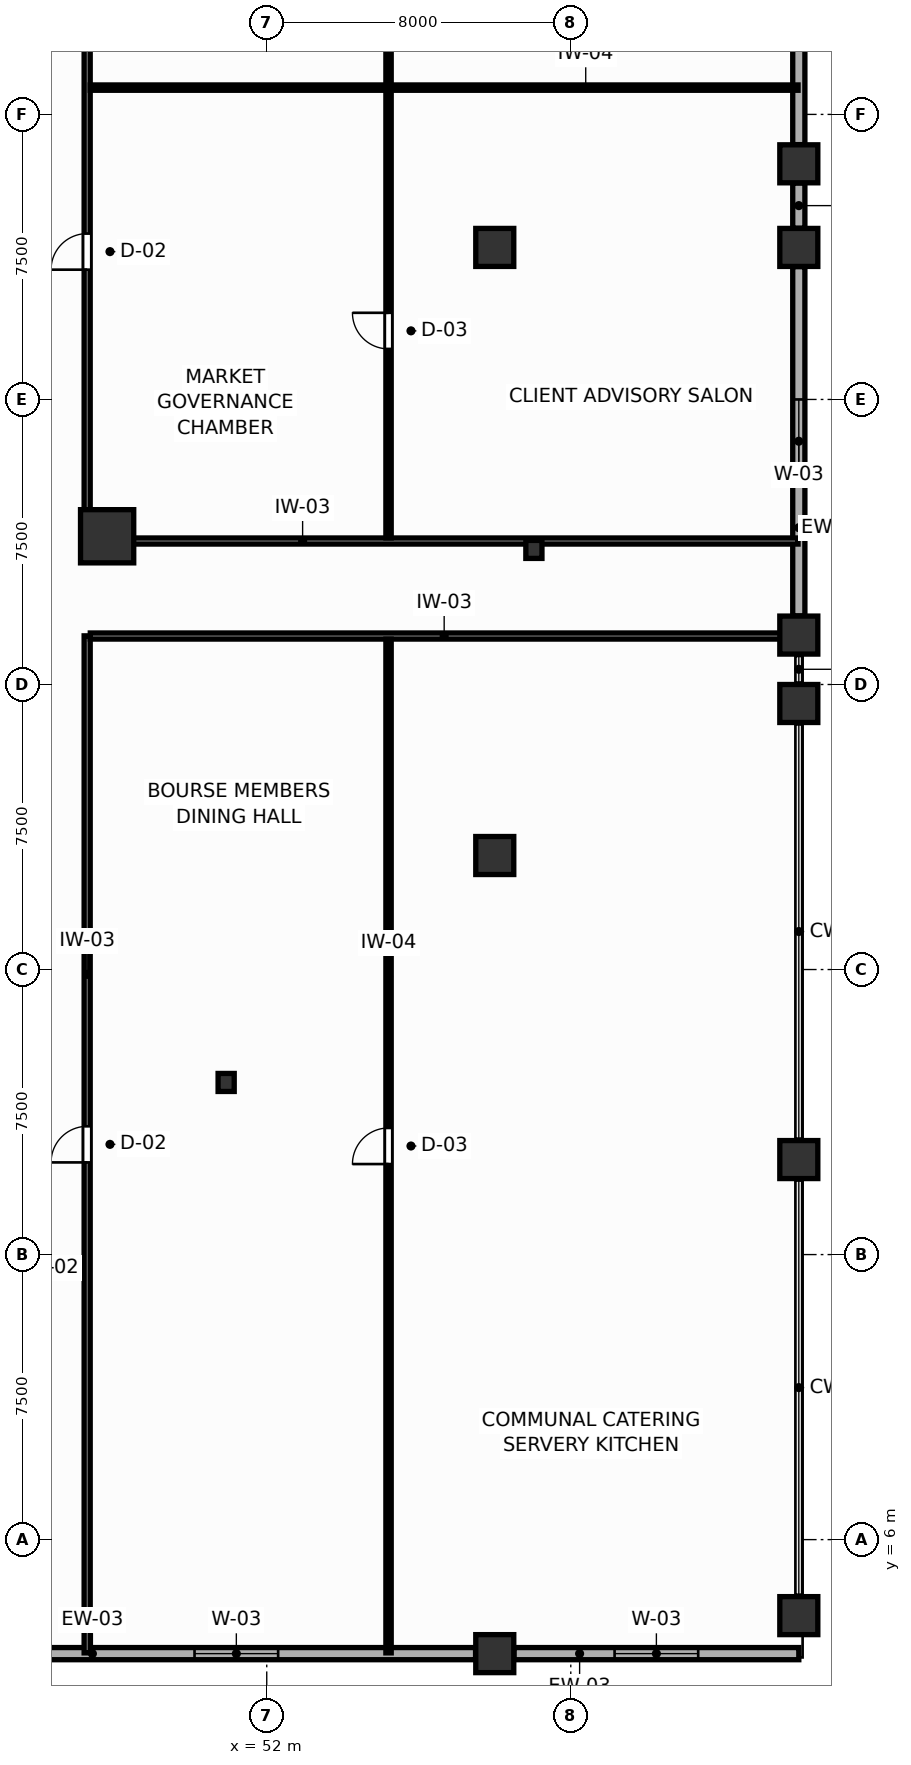
"""IFC4 building model, lengths in metres.
Left out: names, types, materials, properties, quantities, classifications, styles, units other than length and angle.
Written with IfcOpenShell. Run it as: python <this file> out.ifc"""

import sys

from ifc_helpers import new_model, si_unit, direction, frame, frame_2d, origin, origin_2d, place, context, subcontext, project, spatial, rectangle, i_section, extrude, source, transform, mapped, element, fill, save


model = new_model("IFC4")
c1 = context("Model", 3, precision=1e-05, world=origin(), true_north=direction((0.0, 1.0)))
c2 = subcontext(c1, "Body", "Model", "MODEL_VIEW")
j1 = project(units=[si_unit("LENGTHUNIT", "METRE"), si_unit("PLANEANGLEUNIT", "RADIAN")], contexts=[c1])
p1 = place(None, origin())
s1 = spatial("IfcSite", under=j1, at=p1, CompositionType="ELEMENT")
p2 = place(p1, origin())
s2 = spatial("IfcBuilding", under=s1, at=p2, CompositionType="ELEMENT")
p3 = place(p2, frame((0.0, 0.0, 14.4)))
s3 = spatial("IfcBuildingStorey", under=s2, at=p3, CompositionType="ELEMENT", Elevation=14.4)
m1 = source(origin(), c2, "Body", "SweptSolid", [
    extrude(rectangle(XDim=1.4, YDim=1.4, at=origin_2d()), origin(), (0.0, 0.0, 1.0), 4.8),
])
p4 = place(p3, frame((47.8, 32.4, 0.0), z_axis=(0.0, 0.0, 1.0), x_axis=(1.0, 0.0, 0.0)))
e1 = element("IfcColumn", 1, at=p4, inside=s3, PredefinedType="COLUMN", context=c2, shape_type="MappedRepresentation", body=[
    mapped(m1, transform((0.0, 0.0, 0.0), scale=1.0)),
])
m2 = source(origin(), c2, "Body", "SweptSolid", [
    extrude(rectangle(XDim=1.0, YDim=1.0, at=origin_2d()), origin(), (0.0, 0.0, 1.0), 4.8),
])
for number, where, z_axis, x_axis in (
    (2, (66.0, 4.0, 0.0), (0.0, 0.0, 1.0), (1.0, 0.0, 0.0)),
    (3, (66.0, 16.0, 0.0), (0.0, 0.0, 1.0), (1.0, 0.0, 0.0)),
    (4, (66.0, 28.0, 0.0), (0.0, 0.0, 1.0), (1.0, 0.0, 0.0)),
    (5, (66.0, 40.0, 0.0), (0.0, 0.0, 1.0), (1.0, 0.0, 0.0)),
    (6, (58.0, 3.0, 0.0), (0.0, 0.0, 1.0), (1.0, 0.0, 0.0)),
    (7, (58.0, 24.0, 0.0), (0.0, 0.0, 1.0), (1.0, 0.0, 0.0)),
    (8, (58.0, 40.0, 0.0), (0.0, 0.0, 1.0), (1.0, 0.0, 0.0)),
    (9, (66.0, 29.8, 0.0), (0.0, 0.0, 1.0), (1.0, 0.0, 0.0)),
    (10, (66.0, 42.2, 0.0), (0.0, 0.0, 1.0), (1.0, 0.0, 0.0)),
):
    element("IfcColumn", number, at=place(p3, frame(where, z_axis=z_axis, x_axis=x_axis)), inside=s3, PredefinedType="COLUMN", context=c2, shape_type="MappedRepresentation", body=[
        mapped(m2, transform((0.0, 0.0, 0.0), scale=1.0)),
    ])
m3 = source(origin(), c2, "Body", "SweptSolid", [
    extrude(i_section(OverallWidth=0.424, OverallDepth=0.474, WebThickness=0.045, FlangeThickness=0.072, FilletRadius=0.015, at=origin_2d()), origin(), (0.0, 0.0, 1.0), 4.8),
])
for number, where, z_axis, x_axis in (
    (11, (50.932, 18.029, 0.0), (0.0, 0.0, 1.0), (1.0, 0.0, 0.0)),
    (12, (59.03, 32.054, 0.0), (0.0, 0.0, 1.0), (1.0, 0.0, 0.0)),
):
    element("IfcColumn", number, at=place(p3, frame(where, z_axis=z_axis, x_axis=x_axis)), inside=s3, PredefinedType="COLUMN", context=c2, shape_type="MappedRepresentation", body=[
        mapped(m3, transform((0.0, 0.0, 0.0), scale=1.0)),
    ])
p5 = place(p3, frame((44.905, 3.0, 0.0), z_axis=(0.0, 0.0, 1.0), x_axis=(1.0, 0.0, 0.0)))
e13 = element("IfcWall", 13, at=p5, inside=s3, PredefinedType="SOLIDWALL", context=c2, shape_type="SweptSolid", body=[
    extrude(rectangle(XDim=12.59, YDim=0.32, at=frame_2d((6.295, 0.0))), origin(), (0.0, 0.0, 1.0), 3.82),
])
p6 = place(p5, frame((5.195, 0.0, 0.75)))
e14 = element("IfcOpeningElement", 14, at=p6, cuts=e13, PredefinedType="OPENING", context=c2, shape_type="SweptSolid", body=[
    extrude(rectangle(XDim=2.2, YDim=2.0, at=frame_2d((1.1, 1.0))), frame((0.0, 0.17, 0.0), z_axis=(0.0, -1.0, 0.0), x_axis=(1.0, 0.0, 0.0)), (0.0, 0.0, 1.0), 0.34),
])
p7 = place(p3, frame((58.505, 3.0, 0.0), z_axis=(0.0, 0.0, 1.0), x_axis=(1.0, 0.0, 0.0)))
e15 = element("IfcWall", 15, at=p7, inside=s3, PredefinedType="SOLIDWALL", context=c2, shape_type="SweptSolid", body=[
    extrude(rectangle(XDim=7.495, YDim=0.32, at=frame_2d((3.748, 0.0))), origin(), (0.0, 0.0, 1.0), 3.82),
])
p8 = place(p7, frame((2.647, 0.0, 0.75)))
e16 = element("IfcOpeningElement", 16, at=p8, cuts=e15, PredefinedType="OPENING", context=c2, shape_type="SweptSolid", body=[
    extrude(rectangle(XDim=2.2, YDim=2.0, at=frame_2d((1.1, 1.0))), frame((0.0, 0.17, 0.0), z_axis=(0.0, -1.0, 0.0), x_axis=(1.0, 0.0, 0.0)), (0.0, 0.0, 1.0), 0.34),
])
p9 = place(p3, frame((66.0, 30.305, 0.0), z_axis=(0.0, 0.0, 1.0), x_axis=(0.0, 1.0, 0.0)))
e17 = element("IfcWall", 17, at=p9, inside=s3, PredefinedType="SOLIDWALL", context=c2, shape_type="SweptSolid", body=[
    extrude(rectangle(XDim=9.19, YDim=0.32, at=frame_2d((4.595, 0.0))), origin(), (0.0, 0.0, 1.0), 3.82),
])
p10 = place(p9, frame((3.495, 0.0, 0.75)))
e18 = element("IfcOpeningElement", 18, at=p10, cuts=e17, PredefinedType="OPENING", context=c2, shape_type="SweptSolid", body=[
    extrude(rectangle(XDim=2.2, YDim=2.0, at=frame_2d((1.1, 1.0))), frame((0.0, 0.17, 0.0), z_axis=(0.0, -1.0, 0.0), x_axis=(1.0, 0.0, 0.0)), (0.0, 0.0, 1.0), 0.34),
])
p11 = place(p3, frame((66.0, 40.505, 0.0), z_axis=(0.0, 0.0, 1.0), x_axis=(0.0, 1.0, 0.0)))
e19 = element("IfcWall", 19, at=p11, inside=s3, PredefinedType="SOLIDWALL", context=c2, shape_type="SweptSolid", body=[
    extrude(rectangle(XDim=1.19, YDim=0.32, at=frame_2d((0.595, 0.0))), origin(), (0.0, 0.0, 1.0), 3.82),
])
p12 = place(p3, frame((66.0, 42.705, 0.0), z_axis=(0.0, 0.0, 1.0), x_axis=(0.0, 1.0, 0.0)))
e20 = element("IfcWall", 20, at=p12, inside=s3, PredefinedType="SOLIDWALL", context=c2, shape_type="SweptSolid", body=[
    extrude(rectangle(XDim=7.27, YDim=0.32, at=frame_2d((3.635, 0.0))), origin(), (0.0, 0.0, 1.0), 3.82),
])
p13 = place(p12, frame((2.535, 0.0, 0.75)))
e21 = element("IfcOpeningElement", 21, at=p13, cuts=e20, PredefinedType="OPENING", context=c2, shape_type="SweptSolid", body=[
    extrude(rectangle(XDim=2.2, YDim=2.0, at=frame_2d((1.1, 1.0))), frame((0.0, 0.17, 0.0), z_axis=(0.0, -1.0, 0.0), x_axis=(1.0, 0.0, 0.0)), (0.0, 0.0, 1.0), 0.34),
])
p14 = place(p3, frame((47.275, 3.02, 0.0), z_axis=(0.0, 0.0, 1.0), x_axis=(0.0, 1.0, 0.0)))
e22 = element("IfcWall", 22, at=p14, inside=s3, PredefinedType="PARTITIONING", context=c2, shape_type="SweptSolid", body=[
    extrude(rectangle(XDim=26.76, YDim=0.16, at=frame_2d((13.38, 0.0))), origin(), (0.0, 0.0, 1.0), 4.52),
])
p15 = place(p14, frame((12.905, 0.0, 0.0)))
e23 = element("IfcOpeningElement", 23, at=p15, cuts=e22, PredefinedType="OPENING", context=c2, shape_type="SweptSolid", body=[
    extrude(rectangle(XDim=0.95, YDim=2.05, at=frame_2d((0.475, 1.025))), frame((0.0, 0.09, 0.0), z_axis=(0.0, -1.0, 0.0), x_axis=(1.0, 0.0, 0.0)), (0.0, 0.0, 1.0), 0.18),
])
p16 = place(p3, frame((47.275, 32.27, 0.0), z_axis=(0.0, 0.0, 1.0), x_axis=(0.0, 1.0, 0.0)))
e24 = element("IfcWall", 24, at=p16, inside=s3, PredefinedType="PARTITIONING", context=c2, shape_type="SweptSolid", body=[
    extrude(rectangle(XDim=26.71, YDim=0.16, at=frame_2d((13.355, 0.0))), origin(), (0.0, 0.0, 1.0), 4.52),
])
p17 = place(p16, frame((7.145, 0.0, 0.0)))
e25 = element("IfcOpeningElement", 25, at=p17, cuts=e24, PredefinedType="OPENING", context=c2, shape_type="SweptSolid", body=[
    extrude(rectangle(XDim=0.95, YDim=2.05, at=frame_2d((0.475, 1.025))), frame((0.0, 0.09, 0.0), z_axis=(0.0, -1.0, 0.0), x_axis=(1.0, 0.0, 0.0)), (0.0, 0.0, 1.0), 0.18),
])
p18 = place(p16, frame((18.79, 0.0, 0.0)))
e26 = element("IfcOpeningElement", 26, at=p18, cuts=e24, PredefinedType="OPENING", context=c2, shape_type="SweptSolid", body=[
    extrude(rectangle(XDim=0.95, YDim=2.05, at=frame_2d((0.475, 1.025))), frame((0.0, 0.09, 0.0), z_axis=(0.0, -1.0, 0.0), x_axis=(1.0, 0.0, 0.0)), (0.0, 0.0, 1.0), 0.18),
])
p19 = place(p3, frame((47.357, 29.775, 0.0), z_axis=(0.0, 0.0, 1.0), x_axis=(1.0, 0.0, 0.0)))
e27 = element("IfcWall", 27, at=p19, inside=s3, PredefinedType="PARTITIONING", context=c2, shape_type="SweptSolid", body=[
    extrude(rectangle(XDim=18.623, YDim=0.16, at=frame_2d((9.312, 0.0))), origin(), (0.0, 0.0, 1.0), 4.52),
])
p20 = place(p3, frame((47.357, 32.275, 0.0), z_axis=(0.0, 0.0, 1.0), x_axis=(1.0, 0.0, 0.0)))
e28 = element("IfcWall", 28, at=p20, inside=s3, PredefinedType="PARTITIONING", context=c2, shape_type="SweptSolid", body=[
    extrude(rectangle(XDim=18.623, YDim=0.16, at=frame_2d((9.312, 0.0))), origin(), (0.0, 0.0, 1.0), 3.82),
])
p21 = place(p3, frame((55.205, 3.02, 0.0), z_axis=(0.0, 0.0, 1.0), x_axis=(0.0, 1.0, 0.0)))
e29 = element("IfcWall", 29, at=p21, inside=s3, PredefinedType="PARTITIONING", context=c2, shape_type="SweptSolid", body=[
    extrude(rectangle(XDim=26.673, YDim=0.14, at=frame_2d((13.336, 0.0))), origin(), (0.0, 0.0, 1.0), 4.52),
])
p22 = place(p21, frame((12.862, 0.0, 0.0)))
e30 = element("IfcOpeningElement", 30, at=p22, cuts=e29, PredefinedType="OPENING", context=c2, shape_type="SweptSolid", body=[
    extrude(rectangle(XDim=0.95, YDim=2.05, at=frame_2d((0.475, 1.025))), frame((0.0, 0.08, 0.0), z_axis=(0.0, -1.0, 0.0), x_axis=(1.0, 0.0, 0.0)), (0.0, 0.0, 1.0), 0.16),
])
p23 = place(p3, frame((55.205, 32.357, 0.0), z_axis=(0.0, 0.0, 1.0), x_axis=(0.0, 1.0, 0.0)))
e31 = element("IfcWall", 31, at=p23, inside=s3, PredefinedType="PARTITIONING", context=c2, shape_type="SweptSolid", body=[
    extrude(rectangle(XDim=26.623, YDim=0.14, at=frame_2d((13.312, 0.0))), origin(), (0.0, 0.0, 1.0), 4.52),
])
p24 = place(p23, frame((4.973, 0.0, 0.0)))
e32 = element("IfcOpeningElement", 32, at=p24, cuts=e31, PredefinedType="OPENING", context=c2, shape_type="SweptSolid", body=[
    extrude(rectangle(XDim=0.95, YDim=2.05, at=frame_2d((0.475, 1.025))), frame((0.0, 0.08, 0.0), z_axis=(0.0, -1.0, 0.0), x_axis=(1.0, 0.0, 0.0)), (0.0, 0.0, 1.0), 0.16),
])
p25 = place(p23, frame((20.419, 0.0, 0.0)))
e33 = element("IfcOpeningElement", 33, at=p25, cuts=e31, PredefinedType="OPENING", context=c2, shape_type="SweptSolid", body=[
    extrude(rectangle(XDim=0.95, YDim=2.05, at=frame_2d((0.475, 1.025))), frame((0.0, 0.08, 0.0), z_axis=(0.0, -1.0, 0.0), x_axis=(1.0, 0.0, 0.0)), (0.0, 0.0, 1.0), 0.16),
])
p26 = place(p3, frame((47.357, 44.205, 0.0), z_axis=(0.0, 0.0, 1.0), x_axis=(1.0, 0.0, 0.0)))
e34 = element("IfcWall", 34, at=p26, inside=s3, PredefinedType="PARTITIONING", context=c2, shape_type="SweptSolid", body=[
    extrude(rectangle(XDim=18.623, YDim=0.14, at=frame_2d((9.312, 0.0))), origin(), (0.0, 0.0, 1.0), 4.52),
])
p27 = place(p6, origin())
e35 = element("IfcWindow", 35, at=p27, inside=s3, PartitioningType="SINGLE_PANEL", PredefinedType="WINDOW", context=c2, shape_type="SweptSolid", body=[
    extrude(rectangle(XDim=2.2, YDim=2.0, at=frame_2d((1.1, 1.0))), frame((0.0, 0.03, 0.0), z_axis=(0.0, -1.0, 0.0), x_axis=(1.0, 0.0, 0.0)), (0.0, 0.0, 1.0), 0.06),
])
fill(e14, e35)
p28 = place(p8, origin())
e36 = element("IfcWindow", 36, at=p28, inside=s3, PartitioningType="SINGLE_PANEL", PredefinedType="WINDOW", context=c2, shape_type="SweptSolid", body=[
    extrude(rectangle(XDim=2.2, YDim=2.0, at=frame_2d((1.1, 1.0))), frame((0.0, 0.03, 0.0), z_axis=(0.0, -1.0, 0.0), x_axis=(1.0, 0.0, 0.0)), (0.0, 0.0, 1.0), 0.06),
])
fill(e16, e36)
p29 = place(p10, origin())
e37 = element("IfcWindow", 37, at=p29, inside=s3, PartitioningType="SINGLE_PANEL", PredefinedType="WINDOW", context=c2, shape_type="SweptSolid", body=[
    extrude(rectangle(XDim=2.2, YDim=2.0, at=frame_2d((1.1, 1.0))), frame((0.0, 0.03, 0.0), z_axis=(0.0, -1.0, 0.0), x_axis=(1.0, 0.0, 0.0)), (0.0, 0.0, 1.0), 0.06),
])
fill(e18, e37)
p30 = place(p15, origin())
e38 = element("IfcDoor", 38, at=p30, inside=s3, OperationType="SINGLE_SWING_LEFT", PredefinedType="DOOR", context=c2, shape_type="SweptSolid", body=[
    extrude(rectangle(XDim=0.95, YDim=2.05, at=frame_2d((0.475, 1.025))), frame((0.0, 0.025, 0.0), z_axis=(0.0, -1.0, 0.0), x_axis=(1.0, 0.0, 0.0)), (0.0, 0.0, 1.0), 0.05),
])
fill(e23, e38)
p31 = place(p17, origin())
e39 = element("IfcDoor", 39, at=p31, inside=s3, OperationType="SINGLE_SWING_LEFT", PredefinedType="DOOR", context=c2, shape_type="SweptSolid", body=[
    extrude(rectangle(XDim=0.95, YDim=2.05, at=frame_2d((0.475, 1.025))), frame((0.0, 0.025, 0.0), z_axis=(0.0, -1.0, 0.0), x_axis=(1.0, 0.0, 0.0)), (0.0, 0.0, 1.0), 0.05),
])
fill(e25, e39)
p32 = place(p22, origin())
e40 = element("IfcDoor", 40, at=p32, inside=s3, OperationType="SINGLE_SWING_LEFT", PredefinedType="DOOR", context=c2, shape_type="SweptSolid", body=[
    extrude(rectangle(XDim=0.95, YDim=2.05, at=frame_2d((0.475, 1.025))), frame((0.0, 0.025, 0.0), z_axis=(0.0, -1.0, 0.0), x_axis=(1.0, 0.0, 0.0)), (0.0, 0.0, 1.0), 0.05),
])
fill(e30, e40)
p33 = place(p24, origin())
e41 = element("IfcDoor", 41, at=p33, inside=s3, OperationType="SINGLE_SWING_RIGHT", PredefinedType="DOOR", context=c2, shape_type="SweptSolid", body=[
    extrude(rectangle(XDim=0.95, YDim=2.05, at=frame_2d((0.475, 1.025))), frame((0.0, 0.025, 0.0), z_axis=(0.0, -1.0, 0.0), x_axis=(1.0, 0.0, 0.0)), (0.0, 0.0, 1.0), 0.05),
])
fill(e32, e41)
save(model, sys.argv[1])
